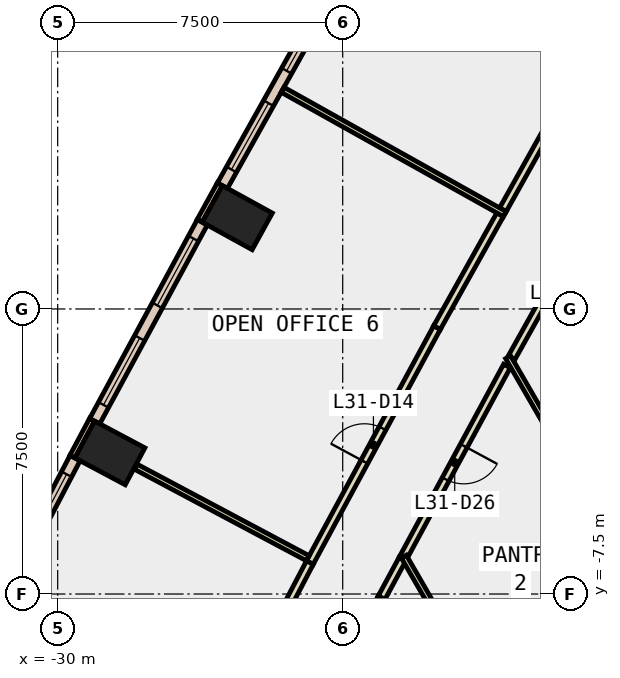
"""IFC4 building model, lengths in metres.
Left out: names, types, materials, properties, quantities, classifications, styles, units other than length and angle.
Written with IfcOpenShell. Run it as: python <this file> out.ifc"""

import sys

from ifc_helpers import new_model, si_unit, direction, frame, frame_2d, origin, origin_2d, place, context, subcontext, project, spatial, rectangle, extrude, element, fill, save


model = new_model("IFC4")
c1 = context("Model", 3, precision=1e-05, world=origin(), true_north=direction((0.0, 1.0)))
c2 = subcontext(c1, "Body", "Model", "MODEL_VIEW")
j1 = project(units=[si_unit("LENGTHUNIT", "METRE"), si_unit("PLANEANGLEUNIT", "RADIAN")], contexts=[c1])
p1 = place(None, origin())
s1 = spatial("IfcSite", under=j1, at=p1, CompositionType="ELEMENT")
p2 = place(p1, origin())
s2 = spatial("IfcBuilding", under=s1, at=p2, CompositionType="ELEMENT")
p3 = place(p2, frame((0.0, 0.0, 142.4)))
s3 = spatial("IfcBuildingStorey", under=s2, at=p3, CompositionType="ELEMENT", Elevation=142.4)
for number, where, z_axis, x_axis in (
    (1, (-25.275, 2.403, -0.4), (0.0, 0.0, 1.0), (0.482, 0.876, 0.0)),
    (2, (-28.626, -3.788, -0.4), (0.0, 0.0, 1.0), (0.47, 0.883, 0.0)),
):
    element("IfcColumn", number, at=place(p3, frame(where, z_axis=z_axis, x_axis=x_axis)), inside=s3, PredefinedType="COLUMN", context=c2, shape_type="SweptSolid", body=[
        extrude(rectangle(XDim=1.1, YDim=1.5, at=origin_2d()), origin(), (0.0, 0.0, 1.0), 4.2),
    ])
for number, where, z_axis, x_axis in (
    (3, (-25.733, 3.283, 0.0), (0.0, 0.0, 1.0), (-0.482, -0.876, 0.0)),
    (4, (-29.095, -2.915, 0.0), (0.0, 0.0, 1.0), (-0.47, -0.883, 0.0)),
):
    element("IfcWall", number, at=place(p3, frame(where, z_axis=z_axis, x_axis=x_axis)), inside=s3, PredefinedType="STANDARD", context=c2, shape_type="SweptSolid", body=[
        extrude(rectangle(XDim=1.1, YDim=0.15, at=frame_2d((0.55, 0.0))), origin(), (0.0, 0.0, 1.0), 3.8),
    ])
p4 = place(p3, frame((-22.761, 8.438, 0.0), z_axis=(0.0, 0.0, 1.0), x_axis=(-0.488009846284, -0.872838123555, 0.0)))
e5 = element("IfcWall", 5, at=p4, inside=s3, PredefinedType="STANDARD", context=c2, shape_type="SweptSolid", body=[
    extrude(rectangle(XDim=5.951, YDim=0.3, at=frame_2d((2.976, 0.0))), origin(), (0.0, 0.0, 1.0), 3.8),
])
p5 = place(p4, frame((0.488, 0.0, 0.9)))
e6 = element("IfcOpeningElement", 6, at=p5, cuts=e5, PredefinedType="OPENING", context=c2, shape_type="SweptSolid", body=[
    extrude(rectangle(XDim=2.0, YDim=2.6, at=frame_2d((1.0, 1.3))), frame((0.0, 0.16, 0.0), z_axis=(0.0, -1.0, 0.0), x_axis=(1.0, 0.0, 0.0)), (0.0, 0.0, 1.0), 0.32),
])
p6 = place(p4, frame((3.463, 0.0, 0.9)))
e7 = element("IfcOpeningElement", 7, at=p6, cuts=e5, PredefinedType="OPENING", context=c2, shape_type="SweptSolid", body=[
    extrude(rectangle(XDim=2.0, YDim=2.6, at=frame_2d((1.0, 1.3))), frame((0.0, 0.16, 0.0), z_axis=(0.0, -1.0, 0.0), x_axis=(1.0, 0.0, 0.0)), (0.0, 0.0, 1.0), 0.32),
])
p7 = place(p3, frame((-26.194, 2.282, 0.0), z_axis=(0.0, 0.0, 1.0), x_axis=(-0.475794135288, -0.87955667289, 0.0)))
e8 = element("IfcWall", 8, at=p7, inside=s3, PredefinedType="STANDARD", context=c2, shape_type="SweptSolid", body=[
    extrude(rectangle(XDim=5.952, YDim=0.3, at=frame_2d((2.976, 0.0))), origin(), (0.0, 0.0, 1.0), 3.8),
])
p8 = place(p7, frame((0.488, 0.0, 0.9)))
e9 = element("IfcOpeningElement", 9, at=p8, cuts=e8, PredefinedType="OPENING", context=c2, shape_type="SweptSolid", body=[
    extrude(rectangle(XDim=2.0, YDim=2.6, at=frame_2d((1.0, 1.3))), frame((0.0, 0.16, 0.0), z_axis=(0.0, -1.0, 0.0), x_axis=(1.0, 0.0, 0.0)), (0.0, 0.0, 1.0), 0.32),
])
p9 = place(p7, frame((3.464, 0.0, 0.9)))
e10 = element("IfcOpeningElement", 10, at=p9, cuts=e8, PredefinedType="OPENING", context=c2, shape_type="SweptSolid", body=[
    extrude(rectangle(XDim=2.0, YDim=2.6, at=frame_2d((1.0, 1.3))), frame((0.0, 0.16, 0.0), z_axis=(0.0, -1.0, 0.0), x_axis=(1.0, 0.0, 0.0)), (0.0, 0.0, 1.0), 0.32),
])
p10 = place(p3, frame((-29.542, -3.922, 0.0), z_axis=(0.0, 0.0, 1.0), x_axis=(-0.463809970306, -0.885934710599, 0.0)))
e11 = element("IfcWall", 11, at=p10, inside=s3, PredefinedType="STANDARD", context=c2, shape_type="SweptSolid", body=[
    extrude(rectangle(XDim=5.927, YDim=0.3, at=frame_2d((2.963, 0.0))), origin(), (0.0, 0.0, 1.0), 3.8),
])
p11 = place(p10, frame((0.482, 0.0, 0.9)))
e12 = element("IfcOpeningElement", 12, at=p11, cuts=e11, PredefinedType="OPENING", context=c2, shape_type="SweptSolid", body=[
    extrude(rectangle(XDim=2.0, YDim=2.6, at=frame_2d((1.0, 1.3))), frame((0.0, 0.16, 0.0), z_axis=(0.0, -1.0, 0.0), x_axis=(1.0, 0.0, 0.0)), (0.0, 0.0, 1.0), 0.32),
])
p12 = place(p10, frame((3.445, 0.0, 0.9)))
e13 = element("IfcOpeningElement", 13, at=p12, cuts=e11, PredefinedType="OPENING", context=c2, shape_type="SweptSolid", body=[
    extrude(rectangle(XDim=2.0, YDim=2.6, at=frame_2d((1.0, 1.3))), frame((0.0, 0.16, 0.0), z_axis=(0.0, -1.0, 0.0), x_axis=(1.0, 0.0, 0.0)), (0.0, 0.0, 1.0), 0.32),
])
p13 = place(p3, frame((-14.955, 4.264, 0.0), z_axis=(0.0, 0.0, 1.0), x_axis=(-0.4879770011, -0.872856486713, 0.0)))
e14 = element("IfcWall", 14, at=p13, inside=s3, PredefinedType="PARTITIONING", context=c2, shape_type="SweptSolid", body=[
    extrude(rectangle(XDim=6.363, YDim=0.2, at=frame_2d((3.182, 0.0))), origin(), (0.0, 0.0, 1.0), 3.8),
])
p14 = place(p13, frame((2.681, 0.0, 0.0)))
e15 = element("IfcOpeningElement", 15, at=p14, cuts=e14, PredefinedType="OPENING", context=c2, shape_type="SweptSolid", body=[
    extrude(rectangle(XDim=1.0, YDim=2.1, at=frame_2d((0.5, 1.05))), frame((0.0, 0.11, 0.0), z_axis=(0.0, -1.0, 0.0), x_axis=(1.0, 0.0, 0.0)), (0.0, 0.0, 1.0), 0.22),
])
p15 = place(p3, frame((-18.178, -1.501, 0.0), z_axis=(0.0, 0.0, 1.0), x_axis=(-0.475923642768, -0.879486603795, 0.0)))
e16 = element("IfcWall", 16, at=p15, inside=s3, PredefinedType="PARTITIONING", context=c2, shape_type="SweptSolid", body=[
    extrude(rectangle(XDim=5.776, YDim=0.2, at=frame_2d((2.888, 0.0))), origin(), (0.0, 0.0, 1.0), 3.8),
])
p16 = place(p15, frame((2.388, 0.0, 0.0)))
e17 = element("IfcOpeningElement", 17, at=p16, cuts=e16, PredefinedType="OPENING", context=c2, shape_type="SweptSolid", body=[
    extrude(rectangle(XDim=1.0, YDim=2.1, at=frame_2d((0.5, 1.05))), frame((0.0, 0.11, 0.0), z_axis=(0.0, -1.0, 0.0), x_axis=(1.0, 0.0, 0.0)), (0.0, 0.0, 1.0), 0.22),
])
p17 = place(p3, frame((-21.475, -7.594, 0.0), z_axis=(0.0, 0.0, 1.0), x_axis=(-0.463809970306, -0.885934710599, 0.0)))
e18 = element("IfcWall", 18, at=p17, inside=s3, PredefinedType="PARTITIONING", context=c2, shape_type="SweptSolid", body=[
    extrude(rectangle(XDim=5.927, YDim=0.2, at=frame_2d((2.963, 0.0))), origin(), (0.0, 0.0, 1.0), 3.8),
])
p18 = place(p17, frame((2.464, 0.0, 0.0)))
e19 = element("IfcOpeningElement", 19, at=p18, cuts=e18, PredefinedType="OPENING", context=c2, shape_type="SweptSolid", body=[
    extrude(rectangle(XDim=1.0, YDim=2.1, at=frame_2d((0.5, 1.05))), frame((0.0, 0.11, 0.0), z_axis=(0.0, -1.0, 0.0), x_axis=(1.0, 0.0, 0.0)), (0.0, 0.0, 1.0), 0.22),
])
p19 = place(p3, frame((-20.927, -6.581, 0.0), z_axis=(0.0, 0.0, 1.0), x_axis=(-0.475893856394, -0.879502721682, 0.0)))
e20 = element("IfcWall", 20, at=p19, inside=s3, PredefinedType="PARTITIONING", context=c2, shape_type="SweptSolid", body=[
    extrude(rectangle(XDim=1.152, YDim=0.2, at=frame_2d((0.576, 0.0))), origin(), (0.0, 0.0, 1.0), 3.8),
])
p20 = place(p3, frame((-18.284, 2.612, 0.0), z_axis=(0.0, 0.0, 1.0), x_axis=(0.487871212611, 0.872915620152, 0.0)))
e21 = element("IfcWall", 21, at=p20, inside=s3, PredefinedType="PARTITIONING", context=c2, shape_type="SweptSolid", body=[
    extrude(rectangle(XDim=3.402, YDim=0.2, at=frame_2d((1.701, 0.0))), origin(), (0.0, 0.0, 1.0), 3.8),
])
p21 = place(p3, frame((-23.365, -6.673, 0.0), z_axis=(0.0, 0.0, 1.0), x_axis=(0.47597665142, 0.879457916732, 0.0)))
e22 = element("IfcWall", 22, at=p21, inside=s3, PredefinedType="PARTITIONING", context=c2, shape_type="SweptSolid", body=[
    extrude(rectangle(XDim=7.032, YDim=0.2, at=frame_2d((3.516, 0.0))), origin(), (0.0, 0.0, 1.0), 3.8),
])
p22 = place(p21, frame((3.016, 0.0, 0.0)))
e23 = element("IfcOpeningElement", 23, at=p22, cuts=e22, PredefinedType="OPENING", context=c2, shape_type="SweptSolid", body=[
    extrude(rectangle(XDim=1.0, YDim=2.1, at=frame_2d((0.5, 1.05))), frame((0.0, 0.11, 0.0), z_axis=(0.0, -1.0, 0.0), x_axis=(1.0, 0.0, 0.0)), (0.0, 0.0, 1.0), 0.22),
])
p23 = place(p3, frame((-20.018, -0.489, 0.0), z_axis=(0.0, 0.0, 1.0), x_axis=(0.48792588674, 0.872885060617, 0.0)))
e24 = element("IfcWall", 24, at=p23, inside=s3, PredefinedType="PARTITIONING", context=c2, shape_type="SweptSolid", body=[
    extrude(rectangle(XDim=3.403, YDim=0.2, at=frame_2d((1.701, 0.0))), origin(), (0.0, 0.0, 1.0), 3.8),
])
p24 = place(p3, frame((-26.21, -12.111, 0.0), z_axis=(0.0, 0.0, 1.0), x_axis=(0.46374980173, 0.885966207818, 0.0)))
e25 = element("IfcWall", 25, at=p24, inside=s3, PredefinedType="PARTITIONING", context=c2, shape_type="SweptSolid", body=[
    extrude(rectangle(XDim=6.137, YDim=0.2, at=frame_2d((3.068, 0.0))), origin(), (0.0, 0.0, 1.0), 3.8),
])
p25 = place(p24, frame((2.644, 0.0, 0.0)))
e26 = element("IfcOpeningElement", 26, at=p25, cuts=e25, PredefinedType="OPENING", context=c2, shape_type="SweptSolid", body=[
    extrude(rectangle(XDim=1.0, YDim=2.1, at=frame_2d((0.5, 1.05))), frame((0.0, 0.11, 0.0), z_axis=(0.0, -1.0, 0.0), x_axis=(1.0, 0.0, 0.0)), (0.0, 0.0, 1.0), 0.22),
])
p26 = place(p3, frame((-14.567, -7.469, 0.0), z_axis=(0.0, 0.0, 1.0), x_axis=(-0.500056007527, 0.865993065409, 0.0)))
e27 = element("IfcWall", 27, at=p26, inside=s3, PredefinedType="PARTITIONING", context=c2, shape_type="SweptSolid", body=[
    extrude(rectangle(XDim=7.159, YDim=0.15, at=frame_2d((3.58, 0.0))), origin(), (0.0, 0.0, 1.0), 3.8),
])
p27 = place(p3, frame((-18.518, -10.625, 0.0), z_axis=(0.0, 0.0, 1.0), x_axis=(-0.50001189137, 0.86601853819, 0.0)))
e28 = element("IfcWall", 28, at=p27, inside=s3, PredefinedType="PARTITIONING", context=c2, shape_type="SweptSolid", body=[
    extrude(rectangle(XDim=4.746, YDim=0.15, at=frame_2d((2.373, 0.0))), origin(), (0.0, 0.0, 1.0), 3.8),
])
p28 = place(p3, frame((-18.234, 2.497, 0.0), z_axis=(0.0, 0.0, 1.0), x_axis=(-0.872820235044, 0.4880418397, 0.0)))
e29 = element("IfcWall", 29, at=p28, inside=s3, PredefinedType="PARTITIONING", context=c2, shape_type="SweptSolid", body=[
    extrude(rectangle(XDim=6.7, YDim=0.15, at=frame_2d((3.35, 0.0))), origin(), (0.0, 0.0, 1.0), 3.8),
])
p29 = place(p3, frame((-23.417, -6.56, 0.0), z_axis=(0.0, 0.0, 1.0), x_axis=(-0.882784638588, 0.469777906967, 0.0)))
e30 = element("IfcWall", 30, at=p29, inside=s3, PredefinedType="PARTITIONING", context=c2, shape_type="SweptSolid", body=[
    extrude(rectangle(XDim=5.13, YDim=0.15, at=frame_2d((2.565, 0.0))), origin(), (0.0, 0.0, 1.0), 3.8),
])
p30 = place(p5, origin())
e31 = element("IfcWindow", 31, at=p30, inside=s3, PartitioningType="SINGLE_PANEL", PredefinedType="WINDOW", context=c2, shape_type="SweptSolid", body=[
    extrude(rectangle(XDim=2.0, YDim=2.6, at=frame_2d((1.0, 1.3))), frame((0.0, 0.03, 0.0), z_axis=(0.0, -1.0, 0.0), x_axis=(1.0, 0.0, 0.0)), (0.0, 0.0, 1.0), 0.06),
])
fill(e6, e31)
p31 = place(p6, origin())
e32 = element("IfcWindow", 32, at=p31, inside=s3, PartitioningType="SINGLE_PANEL", PredefinedType="WINDOW", context=c2, shape_type="SweptSolid", body=[
    extrude(rectangle(XDim=2.0, YDim=2.6, at=frame_2d((1.0, 1.3))), frame((0.0, 0.03, 0.0), z_axis=(0.0, -1.0, 0.0), x_axis=(1.0, 0.0, 0.0)), (0.0, 0.0, 1.0), 0.06),
])
fill(e7, e32)
p32 = place(p8, origin())
e33 = element("IfcWindow", 33, at=p32, inside=s3, PartitioningType="SINGLE_PANEL", PredefinedType="WINDOW", context=c2, shape_type="SweptSolid", body=[
    extrude(rectangle(XDim=2.0, YDim=2.6, at=frame_2d((1.0, 1.3))), frame((0.0, 0.03, 0.0), z_axis=(0.0, -1.0, 0.0), x_axis=(1.0, 0.0, 0.0)), (0.0, 0.0, 1.0), 0.06),
])
fill(e9, e33)
p33 = place(p9, origin())
e34 = element("IfcWindow", 34, at=p33, inside=s3, PartitioningType="SINGLE_PANEL", PredefinedType="WINDOW", context=c2, shape_type="SweptSolid", body=[
    extrude(rectangle(XDim=2.0, YDim=2.6, at=frame_2d((1.0, 1.3))), frame((0.0, 0.03, 0.0), z_axis=(0.0, -1.0, 0.0), x_axis=(1.0, 0.0, 0.0)), (0.0, 0.0, 1.0), 0.06),
])
fill(e10, e34)
p34 = place(p11, origin())
e35 = element("IfcWindow", 35, at=p34, inside=s3, PartitioningType="SINGLE_PANEL", PredefinedType="WINDOW", context=c2, shape_type="SweptSolid", body=[
    extrude(rectangle(XDim=2.0, YDim=2.6, at=frame_2d((1.0, 1.3))), frame((0.0, 0.03, 0.0), z_axis=(0.0, -1.0, 0.0), x_axis=(1.0, 0.0, 0.0)), (0.0, 0.0, 1.0), 0.06),
])
fill(e12, e35)
p35 = place(p22, origin())
e36 = element("IfcDoor", 36, at=p35, inside=s3, OperationType="SINGLE_SWING_LEFT", PredefinedType="DOOR", context=c2, shape_type="SweptSolid", body=[
    extrude(rectangle(XDim=1.0, YDim=2.1, at=frame_2d((0.5, 1.05))), frame((0.0, 0.025, 0.0), z_axis=(0.0, -1.0, 0.0), x_axis=(1.0, 0.0, 0.0)), (0.0, 0.0, 1.0), 0.05),
])
fill(e23, e36)
p36 = place(p16, origin())
e37 = element("IfcDoor", 37, at=p36, inside=s3, OperationType="SINGLE_SWING_LEFT", PredefinedType="DOOR", context=c2, shape_type="SweptSolid", body=[
    extrude(rectangle(XDim=1.0, YDim=2.1, at=frame_2d((0.5, 1.05))), frame((0.0, 0.025, 0.0), z_axis=(0.0, -1.0, 0.0), x_axis=(1.0, 0.0, 0.0)), (0.0, 0.0, 1.0), 0.05),
])
fill(e17, e37)
save(model, sys.argv[1])
